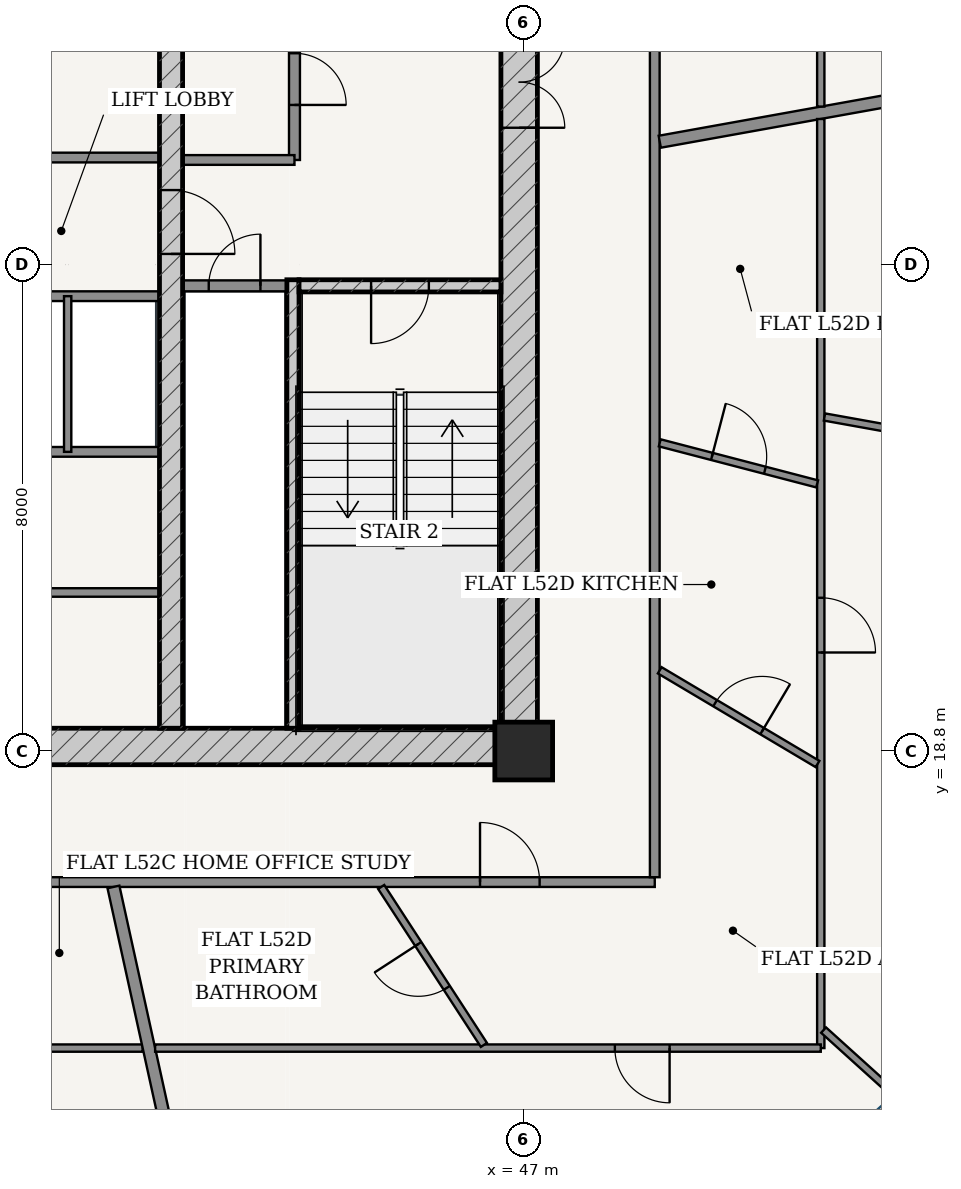
"""IFC4 building model, lengths in metres.
Left out: names, types, materials, properties, quantities, classifications, styles, units other than length and angle.
Written with IfcOpenShell. Run it as: python <this file> out.ifc"""

import sys

from ifc_helpers import new_model, si_unit, direction, frame, frame_2d, origin, origin_2d, place, context, subcontext, project, spatial, rectangle, extrude, source, transform, mapped, element, fill, save


model = new_model("IFC4")
c1 = context("Model", 3, precision=1e-05, world=origin(), true_north=direction((-0.2419218956, 0.970295726276)))
c2 = subcontext(c1, "Body", "Model", "MODEL_VIEW")
j1 = project(units=[si_unit("LENGTHUNIT", "METRE"), si_unit("PLANEANGLEUNIT", "RADIAN")], contexts=[c1])
p1 = place(None, origin())
s1 = spatial("IfcSite", under=j1, at=p1, CompositionType="ELEMENT")
p2 = place(p1, origin())
s2 = spatial("IfcBuilding", under=s1, at=p2, CompositionType="ELEMENT")
p3 = place(p2, frame((0.0, 0.0, 198.6)))
s3 = spatial("IfcBuildingStorey", under=s2, at=p3, CompositionType="ELEMENT", Elevation=198.6)
p4 = place(p3, frame((47.0, 18.8, 0.0), z_axis=(0.0, 0.0, 1.0), x_axis=(1.0, 0.0, 0.0)))
e1 = element("IfcColumn", 1, at=p4, inside=s3, PredefinedType="COLUMN", context=c2, shape_type="SweptSolid", body=[
    extrude(rectangle(XDim=0.95, YDim=0.95, at=origin_2d()), origin(), (0.0, 0.0, 1.0), 3.7),
])
p5 = place(p3, frame((28.775, 18.875, 0.0), z_axis=(0.0, 0.0, 1.0), x_axis=(1.0, 0.0, 0.0)))
e2 = element("IfcWall", 2, at=p5, inside=s3, PredefinedType="SHEAR", context=c2, shape_type="SweptSolid", body=[
    extrude(rectangle(XDim=18.45, YDim=0.6, at=frame_2d((9.225, 0.0))), origin(), (0.0, 0.0, 1.0), 3.435),
])
p6 = place(p5, frame((8.8, 0.0, 0.0)))
e3 = element("IfcOpeningElement", 3, at=p6, cuts=e2, PredefinedType="OPENING", context=c2, shape_type="SweptSolid", body=[
    extrude(rectangle(XDim=0.85, YDim=2.1, at=frame_2d((0.425, 1.05))), frame((0.0, 0.31, 0.0), z_axis=(0.0, -1.0, 0.0), x_axis=(1.0, 0.0, 0.0)), (0.0, 0.0, 1.0), 0.62),
])
p7 = place(p3, frame((46.925, 19.175, 0.0), z_axis=(0.0, 0.0, 1.0), x_axis=(0.0, 1.0, 0.0)))
e4 = element("IfcWall", 4, at=p7, inside=s3, PredefinedType="SHEAR", context=c2, shape_type="SweptSolid", body=[
    extrude(rectangle(XDim=15.25, YDim=0.6, at=frame_2d((7.625, 0.0))), origin(), (0.0, 0.0, 1.0), 3.435),
])
p8 = place(p7, frame((9.875, 0.0, 0.0)))
e5 = element("IfcOpeningElement", 5, at=p8, cuts=e4, PredefinedType="OPENING", context=c2, shape_type="SweptSolid", body=[
    extrude(rectangle(XDim=1.5, YDim=2.2, at=frame_2d((0.75, 1.1))), frame((0.0, 0.31, 0.0), z_axis=(0.0, -1.0, 0.0), x_axis=(1.0, 0.0, 0.0)), (0.0, 0.0, 1.0), 0.62),
])
p9 = place(p3, frame((43.205, 19.175, 0.0), z_axis=(0.0, 0.0, 1.0), x_axis=(0.0, 1.0, 0.0)))
e6 = element("IfcWall", 6, at=p9, inside=s3, PredefinedType="SOLIDWALL", context=c2, shape_type="SweptSolid", body=[
    extrude(rectangle(XDim=7.375, YDim=0.2, at=frame_2d((3.688, 0.0))), origin(), (0.0, 0.0, 1.0), 3.435),
])
p10 = place(p3, frame((43.305, 26.45, 0.0), z_axis=(0.0, 0.0, 1.0), x_axis=(1.0, 0.0, 0.0)))
e7 = element("IfcWall", 7, at=p10, inside=s3, PredefinedType="SOLIDWALL", context=c2, shape_type="SweptSolid", body=[
    extrude(rectangle(XDim=3.32, YDim=0.2, at=frame_2d((1.66, 0.0))), origin(), (0.0, 0.0, 1.0), 3.435),
])
p11 = place(p10, frame((1.185, 0.0, 0.0)))
e8 = element("IfcOpeningElement", 8, at=p11, cuts=e7, PredefinedType="OPENING", context=c2, shape_type="SweptSolid", body=[
    extrude(rectangle(XDim=0.95, YDim=2.15, at=frame_2d((0.475, 1.075))), frame((0.0, 0.11, 0.0), z_axis=(0.0, -1.0, 0.0), x_axis=(1.0, 0.0, 0.0)), (0.0, 0.0, 1.0), 0.22),
])
p12 = place(p3, frame((41.2, 19.175, 0.0), z_axis=(0.0, 0.0, 1.0), x_axis=(0.0, 1.0, 0.0)))
e9 = element("IfcWall", 9, at=p12, inside=s3, PredefinedType="SHEAR", context=c2, shape_type="SweptSolid", body=[
    extrude(rectangle(XDim=15.25, YDim=0.38, at=frame_2d((7.625, 0.0))), origin(), (0.0, 0.0, 1.0), 3.435),
])
p13 = place(p12, frame((7.8, 0.0, 0.0)))
e10 = element("IfcOpeningElement", 10, at=p13, cuts=e9, PredefinedType="OPENING", context=c2, shape_type="SweptSolid", body=[
    extrude(rectangle(XDim=1.05, YDim=2.15, at=frame_2d((0.525, 1.075))), frame((0.0, 0.2, 0.0), z_axis=(0.0, -1.0, 0.0), x_axis=(1.0, 0.0, 0.0)), (0.0, 0.0, 1.0), 0.4),
])
p14 = place(p3, frame((41.39, 26.45, 0.0), z_axis=(0.0, 0.0, 1.0), x_axis=(1.0, 0.0, 0.0)))
e11 = element("IfcWall", 11, at=p14, inside=s3, PredefinedType="PARTITIONING", context=c2, shape_type="SweptSolid", body=[
    extrude(rectangle(XDim=1.71, YDim=0.18, at=frame_2d((0.855, 0.0))), origin(), (0.0, 0.0, 1.0), 3.435),
])
p15 = place(p14, frame((0.43, 0.0, 0.0)))
e12 = element("IfcOpeningElement", 12, at=p15, cuts=e11, PredefinedType="OPENING", context=c2, shape_type="SweptSolid", body=[
    extrude(rectangle(XDim=0.85, YDim=2.1, at=frame_2d((0.425, 1.05))), frame((0.0, 0.1, 0.0), z_axis=(0.0, -1.0, 0.0), x_axis=(1.0, 0.0, 0.0)), (0.0, 0.0, 1.0), 0.2),
])
p16 = place(p3, frame((43.23, 28.52, 0.0), z_axis=(0.0, 0.0, 1.0), x_axis=(0.0, 1.0, 0.0)))
e13 = element("IfcWall", 13, at=p16, inside=s3, PredefinedType="PARTITIONING", context=c2, shape_type="SweptSolid", body=[
    extrude(rectangle(XDim=5.905, YDim=0.18, at=frame_2d((2.953, 0.0))), origin(), (0.0, 0.0, 1.0), 3.435),
])
p17 = place(p16, frame((0.905, 0.0, 0.0)))
e14 = element("IfcOpeningElement", 14, at=p17, cuts=e13, PredefinedType="OPENING", context=c2, shape_type="SweptSolid", body=[
    extrude(rectangle(XDim=0.85, YDim=2.1, at=frame_2d((0.425, 1.05))), frame((0.0, 0.1, 0.0), z_axis=(0.0, -1.0, 0.0), x_axis=(1.0, 0.0, 0.0)), (0.0, 0.0, 1.0), 0.2),
])
p18 = place(p16, frame((3.655, 0.0, 0.0)))
e15 = element("IfcOpeningElement", 15, at=p18, cuts=e13, PredefinedType="OPENING", context=c2, shape_type="SweptSolid", body=[
    extrude(rectangle(XDim=1.15, YDim=2.2, at=frame_2d((0.575, 1.1))), frame((0.0, 0.1, 0.0), z_axis=(0.0, -1.0, 0.0), x_axis=(1.0, 0.0, 0.0)), (0.0, 0.0, 1.0), 0.2),
])
p19 = place(p3, frame((41.39, 28.52, 0.0), z_axis=(0.0, 0.0, 1.0), x_axis=(1.0, 0.0, 0.0)))
e16 = element("IfcWall", 16, at=p19, inside=s3, PredefinedType="PARTITIONING", context=c2, shape_type="SweptSolid", body=[
    extrude(rectangle(XDim=1.84, YDim=0.16, at=frame_2d((0.92, 0.0))), origin(), (0.0, 0.0, 1.0), 3.435),
])
p20 = place(p3, frame((34.99, 28.56, 0.0), z_axis=(0.0, 0.0, 1.0), x_axis=(1.0, 0.0, 0.0)))
e17 = element("IfcWall", 17, at=p20, inside=s3, PredefinedType="PARTITIONING", context=c2, shape_type="SweptSolid", body=[
    extrude(rectangle(XDim=6.02, YDim=0.16, at=frame_2d((3.01, 0.0))), origin(), (0.0, 0.0, 1.0), 3.435),
])
p21 = place(p20, frame((2.585, 0.0, 0.0)))
e18 = element("IfcOpeningElement", 18, at=p21, cuts=e17, PredefinedType="OPENING", context=c2, shape_type="SweptSolid", body=[
    extrude(rectangle(XDim=0.85, YDim=2.1, at=frame_2d((0.425, 1.05))), frame((0.0, 0.09, 0.0), z_axis=(0.0, -1.0, 0.0), x_axis=(1.0, 0.0, 0.0)), (0.0, 0.0, 1.0), 0.18),
])
p22 = place(p3, frame((34.99, 26.28, 0.0), z_axis=(0.0, 0.0, 1.0), x_axis=(1.0, 0.0, 0.0)))
e19 = element("IfcWall", 19, at=p22, inside=s3, PredefinedType="PARTITIONING", context=c2, shape_type="SweptSolid", body=[
    extrude(rectangle(XDim=6.02, YDim=0.16, at=frame_2d((3.01, 0.0))), origin(), (0.0, 0.0, 1.0), 3.435),
])
p23 = place(p22, frame((0.225, 0.0, 0.0)))
e20 = element("IfcOpeningElement", 20, at=p23, cuts=e19, PredefinedType="OPENING", context=c2, shape_type="SweptSolid", body=[
    extrude(rectangle(XDim=1.1, YDim=2.2, at=frame_2d((0.55, 1.1))), frame((0.0, 0.09, 0.0), z_axis=(0.0, -1.0, 0.0), x_axis=(1.0, 0.0, 0.0)), (0.0, 0.0, 1.0), 0.18),
])
p24 = place(p22, frame((1.705, 0.0, 0.0)))
e21 = element("IfcOpeningElement", 21, at=p24, cuts=e19, PredefinedType="OPENING", context=c2, shape_type="SweptSolid", body=[
    extrude(rectangle(XDim=1.1, YDim=2.2, at=frame_2d((0.55, 1.1))), frame((0.0, 0.09, 0.0), z_axis=(0.0, -1.0, 0.0), x_axis=(1.0, 0.0, 0.0)), (0.0, 0.0, 1.0), 0.18),
])
p25 = place(p3, frame((34.99, 23.72, 0.0), z_axis=(0.0, 0.0, 1.0), x_axis=(1.0, 0.0, 0.0)))
e22 = element("IfcWall", 22, at=p25, inside=s3, PredefinedType="PARTITIONING", context=c2, shape_type="SweptSolid", body=[
    extrude(rectangle(XDim=6.02, YDim=0.16, at=frame_2d((3.01, 0.0))), origin(), (0.0, 0.0, 1.0), 3.435),
])
p26 = place(p3, frame((39.5, 23.72, 0.0), z_axis=(0.0, 0.0, 1.0), x_axis=(0.0, 1.0, 0.0)))
e23 = element("IfcWall", 23, at=p26, inside=s3, PredefinedType="PARTITIONING", context=c2, shape_type="SweptSolid", body=[
    extrude(rectangle(XDim=2.56, YDim=0.12, at=frame_2d((1.28, 0.0))), origin(), (0.0, 0.0, 1.0), 3.435),
])
p27 = place(p3, frame((34.99, 21.407, 0.0), z_axis=(0.0, 0.0, 1.0), x_axis=(1.0, 0.0, 0.0)))
e24 = element("IfcWall", 24, at=p27, inside=s3, PredefinedType="PARTITIONING", context=c2, shape_type="SweptSolid", body=[
    extrude(rectangle(XDim=6.02, YDim=0.14, at=frame_2d((3.01, 0.0))), origin(), (0.0, 0.0, 1.0), 3.435),
])
p28 = place(p27, frame((2.585, 0.0, 0.0)))
e25 = element("IfcOpeningElement", 25, at=p28, cuts=e24, PredefinedType="OPENING", context=c2, shape_type="SweptSolid", body=[
    extrude(rectangle(XDim=0.85, YDim=2.1, at=frame_2d((0.425, 1.05))), frame((0.0, 0.08, 0.0), z_axis=(0.0, -1.0, 0.0), x_axis=(1.0, 0.0, 0.0)), (0.0, 0.0, 1.0), 0.16),
])
p29 = place(p3, frame((34.32, 16.645, 0.0), z_axis=(0.0, 0.0, 1.0), x_axis=(1.0, 0.0, 0.0)))
e26 = element("IfcWall", 26, at=p29, inside=s3, PredefinedType="PARTITIONING", context=c2, shape_type="SweptSolid", body=[
    extrude(rectangle(XDim=14.835, YDim=0.16, at=frame_2d((7.417, 0.0))), origin(), (0.0, 0.0, 1.0), 2.951),
])
p30 = place(p29, frame((11.961, 0.0, 0.0)))
e27 = element("IfcOpeningElement", 27, at=p30, cuts=e26, PredefinedType="OPENING", context=c2, shape_type="SweptSolid", body=[
    extrude(rectangle(XDim=0.98, YDim=2.2, at=frame_2d((0.49, 1.1))), frame((0.0, 0.09, 0.0), z_axis=(0.0, -1.0, 0.0), x_axis=(1.0, 0.0, 0.0)), (0.0, 0.0, 1.0), 0.18),
])
p31 = place(p3, frame((49.155, 16.725, 0.0), z_axis=(0.0, 0.0, 1.0), x_axis=(0.0, 1.0, 0.0)))
e28 = element("IfcWall", 28, at=p31, inside=s3, PredefinedType="PARTITIONING", context=c2, shape_type="SweptSolid", body=[
    extrude(rectangle(XDim=18.3, YDim=0.16, at=frame_2d((9.15, 0.0))), origin(), (0.0, 0.0, 1.0), 2.951),
])
p32 = place(p3, frame((49.237, 28.82, 0.0), z_axis=(0.0, 0.0, 1.0), x_axis=(0.984224859606, 0.176922089446, 0.0)))
e29 = element("IfcWall", 29, at=p32, inside=s3, PredefinedType="PARTITIONING", context=c2, shape_type="SweptSolid", body=[
    extrude(rectangle(XDim=10.2, YDim=0.2, at=frame_2d((5.1, 0.0))), origin(), (0.0, 0.0, 1.0), 2.951),
])
p33 = place(p3, frame((51.885, 37.835, 0.0), z_axis=(0.0, 0.0, 1.0), x_axis=(0.0, -1.0, 0.0)))
e30 = element("IfcWall", 30, at=p33, inside=s3, PredefinedType="PARTITIONING", context=c2, shape_type="SweptSolid", body=[
    extrude(rectangle(XDim=8.437, YDim=0.12, at=frame_2d((4.219, 0.0))), origin(), (0.0, 0.0, 1.0), 2.951),
])
p34 = place(p33, frame((0.796, 0.0, 0.0)))
e31 = element("IfcOpeningElement", 31, at=p34, cuts=e30, PredefinedType="OPENING", context=c2, shape_type="SweptSolid", body=[
    extrude(rectangle(XDim=0.9, YDim=2.15, at=frame_2d((0.45, 1.075))), frame((0.0, 0.07, 0.0), z_axis=(0.0, -1.0, 0.0), x_axis=(1.0, 0.0, 0.0)), (0.0, 0.0, 1.0), 0.14),
])
p35 = place(p3, frame((40.734, 13.915, 0.0), z_axis=(0.0, 0.0, 1.0), x_axis=(-1.0, 0.0, 0.0)))
e32 = element("IfcWall", 32, at=p35, inside=s3, PredefinedType="PARTITIONING", context=c2, shape_type="SweptSolid", body=[
    extrude(rectangle(XDim=9.144, YDim=0.12, at=frame_2d((4.572, 0.0))), origin(), (0.0, 0.0, 1.0), 2.951),
])
p36 = place(p35, frame((7.381, 0.0, 0.0)))
e33 = element("IfcOpeningElement", 33, at=p36, cuts=e32, PredefinedType="OPENING", context=c2, shape_type="SweptSolid", body=[
    extrude(rectangle(XDim=0.9, YDim=2.15, at=frame_2d((0.45, 1.075))), frame((0.0, 0.07, 0.0), z_axis=(0.0, -1.0, 0.0), x_axis=(1.0, 0.0, 0.0)), (0.0, 0.0, 1.0), 0.14),
])
p37 = place(p35, frame((2.458, 0.0, 0.0)))
e34 = element("IfcOpeningElement", 34, at=p37, cuts=e32, PredefinedType="OPENING", context=c2, shape_type="SweptSolid", body=[
    extrude(rectangle(XDim=0.9, YDim=2.15, at=frame_2d((0.45, 1.075))), frame((0.0, 0.07, 0.0), z_axis=(0.0, -1.0, 0.0), x_axis=(1.0, 0.0, 0.0)), (0.0, 0.0, 1.0), 0.14),
])
p38 = place(p3, frame((40.253, 16.565, 0.0), z_axis=(0.0, 0.0, 1.0), x_axis=(0.214957946814, -0.976623305631, 0.0)))
e35 = element("IfcWall", 35, at=p38, inside=s3, PredefinedType="PARTITIONING", context=c2, shape_type="SweptSolid", body=[
    extrude(rectangle(XDim=9.202, YDim=0.2, at=frame_2d((4.601, 0.0))), origin(), (0.0, 0.0, 1.0), 2.951),
])
p39 = place(p3, frame((51.885, 29.194, 0.0), z_axis=(0.0, 0.0, 1.0), x_axis=(0.0, -1.0, 0.0)))
e36 = element("IfcWall", 36, at=p39, inside=s3, PredefinedType="PARTITIONING", context=c2, shape_type="SweptSolid", body=[
    extrude(rectangle(XDim=15.279, YDim=0.12, at=frame_2d((7.639, 0.0))), origin(), (0.0, 0.0, 1.0), 2.951),
])
p40 = place(p39, frame((7.873, 0.0, 0.0)))
e37 = element("IfcOpeningElement", 37, at=p40, cuts=e36, PredefinedType="OPENING", context=c2, shape_type="SweptSolid", body=[
    extrude(rectangle(XDim=0.9, YDim=2.15, at=frame_2d((0.45, 1.075))), frame((0.0, 0.07, 0.0), z_axis=(0.0, -1.0, 0.0), x_axis=(1.0, 0.0, 0.0)), (0.0, 0.0, 1.0), 0.14),
])
p41 = place(p3, frame((51.885, 13.915, 0.0), z_axis=(0.0, 0.0, 1.0), x_axis=(-1.0, 0.0, 0.0)))
e38 = element("IfcWall", 38, at=p41, inside=s3, PredefinedType="PARTITIONING", context=c2, shape_type="SweptSolid", body=[
    extrude(rectangle(XDim=10.947, YDim=0.12, at=frame_2d((5.473, 0.0))), origin(), (0.0, 0.0, 1.0), 2.951),
])
p42 = place(p41, frame((2.486, 0.0, 0.0)))
e39 = element("IfcOpeningElement", 39, at=p42, cuts=e38, PredefinedType="OPENING", context=c2, shape_type="SweptSolid", body=[
    extrude(rectangle(XDim=0.9, YDim=2.15, at=frame_2d((0.45, 1.075))), frame((0.0, 0.07, 0.0), z_axis=(0.0, -1.0, 0.0), x_axis=(1.0, 0.0, 0.0)), (0.0, 0.0, 1.0), 0.14),
])
p43 = place(p3, frame((51.931, 14.211, 0.0), z_axis=(0.0, 0.0, 1.0), x_axis=(0.741971265209, -0.670431683026, 0.0)))
e40 = element("IfcWall", 40, at=p43, inside=s3, PredefinedType="PARTITIONING", context=c2, shape_type="SweptSolid", body=[
    extrude(rectangle(XDim=1.938, YDim=0.12, at=frame_2d((0.969, 0.0))), origin(), (0.0, 0.0, 1.0), 2.951),
])
p44 = place(p3, frame((51.946, 24.293, 0.0), z_axis=(0.0, 0.0, 1.0), x_axis=(0.984227185588, -0.176909149424, 0.0)))
e41 = element("IfcWall", 41, at=p44, inside=s3, PredefinedType="PARTITIONING", context=c2, shape_type="SweptSolid", body=[
    extrude(rectangle(XDim=7.448, YDim=0.12, at=frame_2d((3.724, 0.0))), origin(), (0.0, 0.0, 1.0), 2.951),
])
p45 = place(p44, frame((2.264, 0.0, 0.0)))
e42 = element("IfcOpeningElement", 42, at=p45, cuts=e41, PredefinedType="OPENING", context=c2, shape_type="SweptSolid", body=[
    extrude(rectangle(XDim=0.9, YDim=2.15, at=frame_2d((0.45, 1.075))), frame((0.0, 0.07, 0.0), z_axis=(0.0, -1.0, 0.0), x_axis=(1.0, 0.0, 0.0)), (0.0, 0.0, 1.0), 0.14),
])
p46 = place(p3, frame((44.656, 16.565, 0.0), z_axis=(0.0, 0.0, 1.0), x_axis=(0.545173870382, -0.838322999239, 0.0)))
e43 = element("IfcWall", 43, at=p46, inside=s3, PredefinedType="PARTITIONING", context=c2, shape_type="SweptSolid", body=[
    extrude(rectangle(XDim=3.099, YDim=0.12, at=frame_2d((1.549, 0.0))), origin(), (0.0, 0.0, 1.0), 3.11),
])
p47 = place(p46, frame((1.119, 0.0, 0.0)))
e44 = element("IfcOpeningElement", 44, at=p47, cuts=e43, PredefinedType="OPENING", context=c2, shape_type="SweptSolid", body=[
    extrude(rectangle(XDim=0.86, YDim=2.15, at=frame_2d((0.43, 1.075))), frame((0.0, 0.07, 0.0), z_axis=(0.0, -1.0, 0.0), x_axis=(1.0, 0.0, 0.0)), (0.0, 0.0, 1.0), 0.14),
])
p48 = place(p3, frame((49.237, 20.128, 0.0), z_axis=(0.0, 0.0, 1.0), x_axis=(0.859818120481, -0.510600430565, 0.0)))
e45 = element("IfcWall", 45, at=p48, inside=s3, PredefinedType="PARTITIONING", context=c2, shape_type="SweptSolid", body=[
    extrude(rectangle(XDim=3.018, YDim=0.12, at=frame_2d((1.509, 0.0))), origin(), (0.0, 0.0, 1.0), 2.951),
])
p49 = place(p48, frame((1.059, 0.0, 0.0)))
e46 = element("IfcOpeningElement", 46, at=p49, cuts=e45, PredefinedType="OPENING", context=c2, shape_type="SweptSolid", body=[
    extrude(rectangle(XDim=0.9, YDim=2.15, at=frame_2d((0.45, 1.075))), frame((0.0, 0.07, 0.0), z_axis=(0.0, -1.0, 0.0), x_axis=(1.0, 0.0, 0.0)), (0.0, 0.0, 1.0), 0.14),
])
p50 = place(p3, frame((49.237, 23.868, 0.0), z_axis=(0.0, 0.0, 1.0), x_axis=(0.967622119215, -0.252403316946, 0.0)))
e47 = element("IfcWall", 47, at=p50, inside=s3, PredefinedType="PARTITIONING", context=c2, shape_type="SweptSolid", body=[
    extrude(rectangle(XDim=2.675, YDim=0.12, at=frame_2d((1.337, 0.0))), origin(), (0.0, 0.0, 1.0), 3.435),
])
p51 = place(p50, frame((0.887, 0.0, 0.0)))
e48 = element("IfcOpeningElement", 48, at=p51, cuts=e47, PredefinedType="OPENING", context=c2, shape_type="SweptSolid", body=[
    extrude(rectangle(XDim=0.9, YDim=2.15, at=frame_2d((0.45, 1.075))), frame((0.0, 0.07, 0.0), z_axis=(0.0, -1.0, 0.0), x_axis=(1.0, 0.0, 0.0)), (0.0, 0.0, 1.0), 0.14),
])
m1 = source(origin(), c2, "Body", "SweptSolid", [
    extrude(rectangle(XDim=1.5, YDim=2.2, at=frame_2d((0.75, 1.1))), frame((0.0, 0.025, 0.0), z_axis=(0.0, -1.0, 0.0), x_axis=(1.0, 0.0, 0.0)), (0.0, 0.0, 1.0), 0.05),
])
p52 = place(p8, frame((1.5, 0.0, 0.0), z_axis=(0.0, 0.0, 1.0), x_axis=(-1.0, 0.0, 0.0)))
e49 = element("IfcDoor", 49, at=p52, inside=s3, OperationType="DOUBLE_DOOR_SINGLE_SWING", PredefinedType="DOOR", context=c2, shape_type="MappedRepresentation", body=[
    mapped(m1, transform((0.0, 0.0, 0.0), scale=1.0)),
])
fill(e5, e49)
m2 = source(origin(), c2, "Body", "SweptSolid", [
    extrude(rectangle(XDim=1.05, YDim=2.15, at=frame_2d((0.525, 1.075))), frame((0.0, 0.025, 0.0), z_axis=(0.0, -1.0, 0.0), x_axis=(1.0, 0.0, 0.0)), (0.0, 0.0, 1.0), 0.05),
])
p53 = place(p13, frame((1.05, 0.0, 0.0), z_axis=(0.0, 0.0, 1.0), x_axis=(-1.0, 0.0, 0.0)))
e50 = element("IfcDoor", 50, at=p53, inside=s3, OperationType="SINGLE_SWING_RIGHT", PredefinedType="DOOR", context=c2, shape_type="MappedRepresentation", body=[
    mapped(m2, transform((0.0, 0.0, 0.0), scale=1.0)),
])
fill(e10, e50)
m3 = source(origin(), c2, "Body", "SweptSolid", [
    extrude(rectangle(XDim=0.95, YDim=2.15, at=frame_2d((0.475, 1.075))), frame((0.0, 0.025, 0.0), z_axis=(0.0, -1.0, 0.0), x_axis=(1.0, 0.0, 0.0)), (0.0, 0.0, 1.0), 0.05),
])
p54 = place(p11, frame((0.95, 0.0, 0.0), z_axis=(0.0, 0.0, 1.0), x_axis=(-1.0, 0.0, 0.0)))
e51 = element("IfcDoor", 51, at=p54, inside=s3, OperationType="SINGLE_SWING_RIGHT", PredefinedType="DOOR", context=c2, shape_type="MappedRepresentation", body=[
    mapped(m3, transform((0.0, 0.0, 0.0), scale=1.0)),
])
fill(e8, e51)
m4 = source(origin(), c2, "Body", "SweptSolid", [
    extrude(rectangle(XDim=0.85, YDim=2.1, at=frame_2d((0.425, 1.05))), frame((0.0, 0.025, 0.0), z_axis=(0.0, -1.0, 0.0), x_axis=(1.0, 0.0, 0.0)), (0.0, 0.0, 1.0), 0.05),
])
p55 = place(p15, origin())
e52 = element("IfcDoor", 52, at=p55, inside=s3, OperationType="SINGLE_SWING_RIGHT", PredefinedType="DOOR", context=c2, shape_type="MappedRepresentation", body=[
    mapped(m4, transform((0.0, 0.0, 0.0), scale=1.0)),
])
fill(e12, e52)
p56 = place(p17, frame((0.85, 0.0, 0.0), z_axis=(0.0, 0.0, 1.0), x_axis=(-1.0, 0.0, 0.0)))
e53 = element("IfcDoor", 53, at=p56, inside=s3, OperationType="SINGLE_SWING_RIGHT", PredefinedType="DOOR", context=c2, shape_type="MappedRepresentation", body=[
    mapped(m4, transform((0.0, 0.0, 0.0), scale=1.0)),
])
fill(e14, e53)
m5 = source(origin(), c2, "Body", "SweptSolid", [
    extrude(rectangle(XDim=0.98, YDim=2.2, at=frame_2d((0.49, 1.1))), frame((0.0, 0.025, 0.0), z_axis=(0.0, -1.0, 0.0), x_axis=(1.0, 0.0, 0.0)), (0.0, 0.0, 1.0), 0.05),
])
p57 = place(p30, origin())
e54 = element("IfcDoor", 54, at=p57, inside=s3, OperationType="SINGLE_SWING_LEFT", PredefinedType="DOOR", context=c2, shape_type="MappedRepresentation", body=[
    mapped(m5, transform((0.0, 0.0, 0.0), scale=1.0)),
])
fill(e27, e54)
m6 = source(origin(), c2, "Body", "SweptSolid", [
    extrude(rectangle(XDim=0.86, YDim=2.15, at=frame_2d((0.43, 1.075))), frame((0.0, 0.025, 0.0), z_axis=(0.0, -1.0, 0.0), x_axis=(1.0, 0.0, 0.0)), (0.0, 0.0, 1.0), 0.05),
])
p58 = place(p47, frame((0.86, 0.0, 0.0), z_axis=(0.0, 0.0, 1.0), x_axis=(-1.0, 0.0, 0.0)))
e55 = element("IfcDoor", 55, at=p58, inside=s3, OperationType="SINGLE_SWING_RIGHT", PredefinedType="DOOR", context=c2, shape_type="MappedRepresentation", body=[
    mapped(m6, transform((0.0, 0.0, 0.0), scale=1.0)),
])
fill(e44, e55)
m7 = source(origin(), c2, "Body", "SweptSolid", [
    extrude(rectangle(XDim=0.9, YDim=2.15, at=frame_2d((0.45, 1.075))), frame((0.0, 0.025, 0.0), z_axis=(0.0, -1.0, 0.0), x_axis=(1.0, 0.0, 0.0)), (0.0, 0.0, 1.0), 0.05),
])
p59 = place(p42, origin())
e56 = element("IfcDoor", 56, at=p59, inside=s3, OperationType="SINGLE_SWING_LEFT", PredefinedType="DOOR", context=c2, shape_type="MappedRepresentation", body=[
    mapped(m7, transform((0.0, 0.0, 0.0), scale=1.0)),
])
fill(e39, e56)
p60 = place(p49, origin())
e57 = element("IfcDoor", 57, at=p60, inside=s3, OperationType="SINGLE_SWING_RIGHT", PredefinedType="DOOR", context=c2, shape_type="MappedRepresentation", body=[
    mapped(m7, transform((0.0, 0.0, 0.0), scale=1.0)),
])
fill(e46, e57)
p61 = place(p51, origin())
e58 = element("IfcDoor", 58, at=p61, inside=s3, OperationType="SINGLE_SWING_LEFT", PredefinedType="DOOR", context=c2, shape_type="MappedRepresentation", body=[
    mapped(m7, transform((0.0, 0.0, 0.0), scale=1.0)),
])
fill(e48, e58)
p62 = place(p40, origin())
e59 = element("IfcDoor", 59, at=p62, inside=s3, OperationType="SINGLE_SWING_RIGHT", PredefinedType="DOOR", context=c2, shape_type="MappedRepresentation", body=[
    mapped(m7, transform((0.0, 0.0, 0.0), scale=1.0)),
])
fill(e37, e59)
save(model, sys.argv[1])
